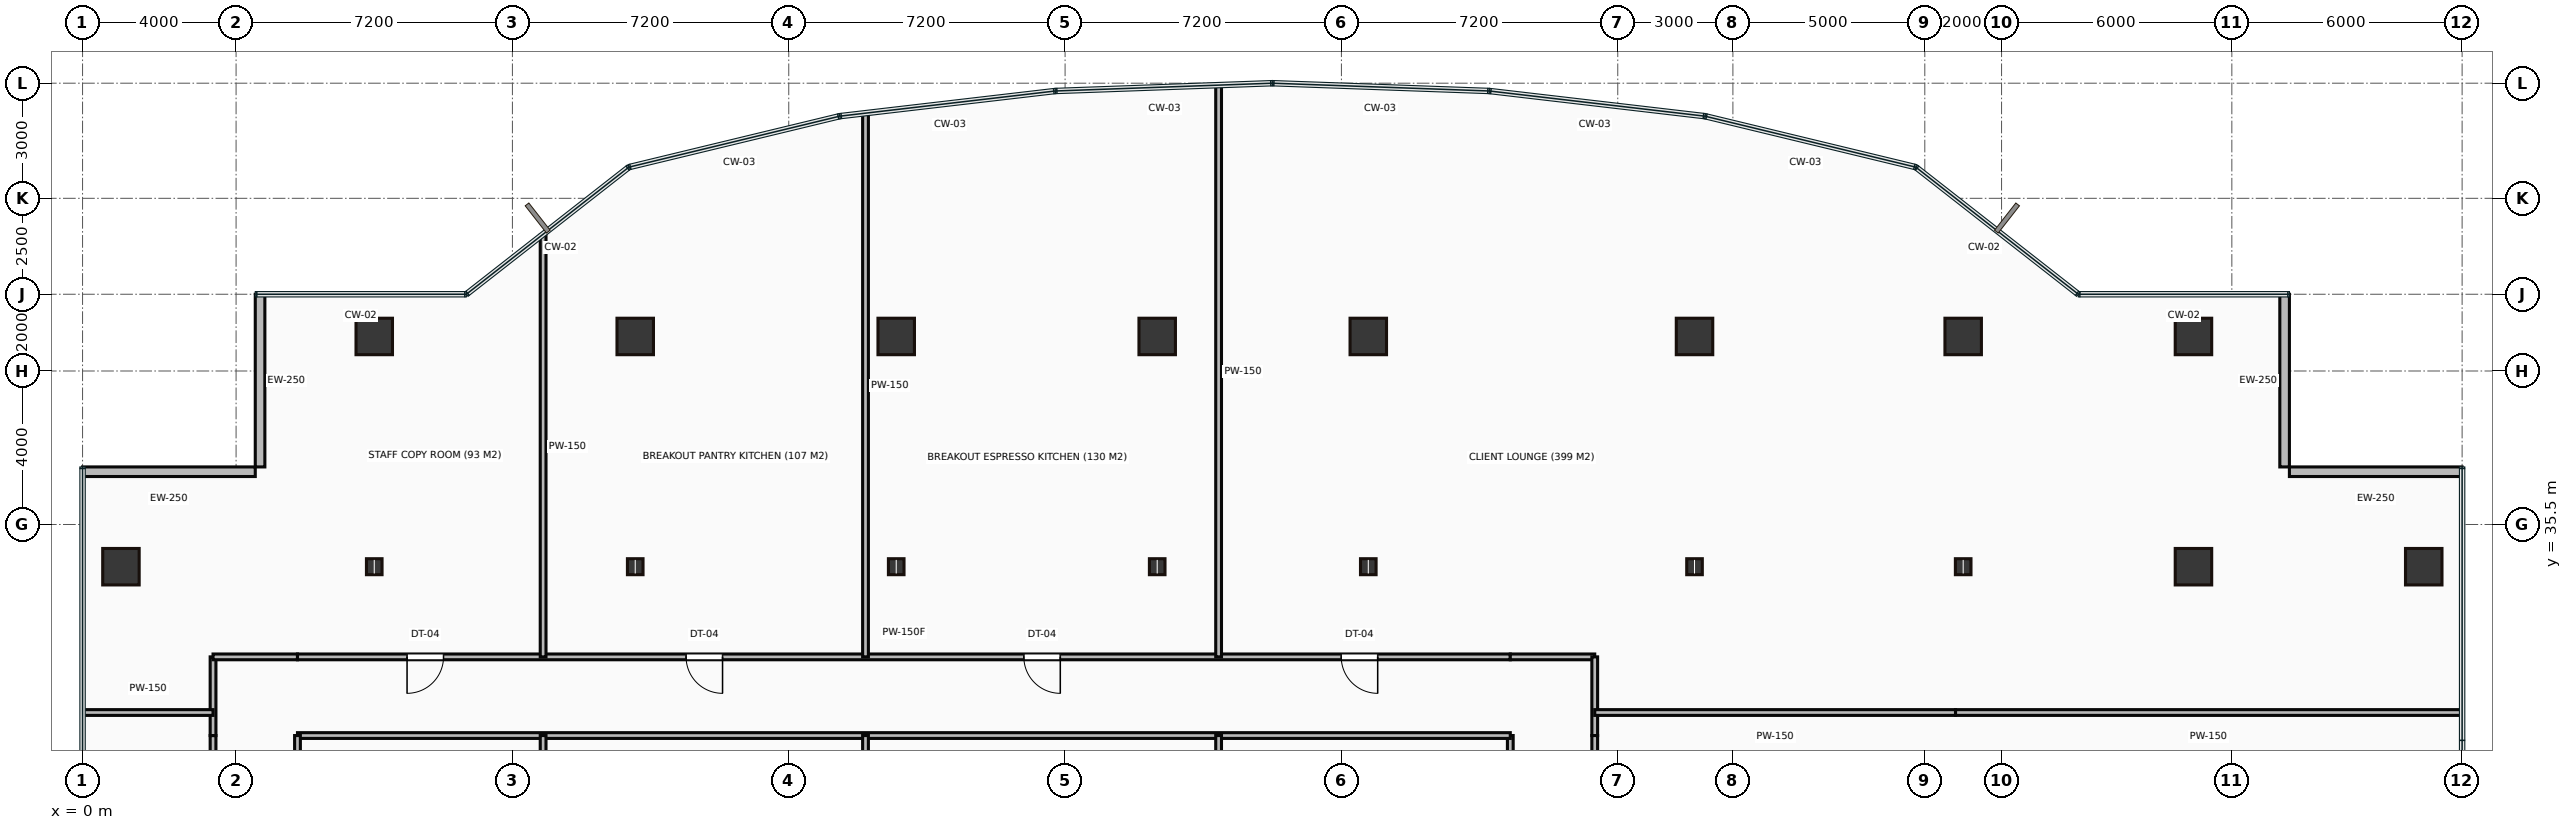
"""IFC4 building model, lengths in metres.
Left out: names, types, materials, properties, quantities, classifications, styles, units other than length and angle.
Written with IfcOpenShell. Run it as: python <this file> out.ifc"""

import sys

from ifc_helpers import new_model, si_unit, direction, frame, frame_2d, origin, origin_2d, place, context, subcontext, project, spatial, rectangle, hollow_rectangle, i_section, extrude, source, transform, mapped, element, fill, save


model = new_model("IFC4")
c1 = context("Model", 3, precision=1e-05, world=origin(), true_north=direction((0.0, 1.0)))
c2 = subcontext(c1, "Body", "Model", "MODEL_VIEW")
j1 = project(units=[si_unit("LENGTHUNIT", "METRE"), si_unit("PLANEANGLEUNIT", "RADIAN")], contexts=[c1])
p1 = place(None, origin())
s1 = spatial("IfcSite", under=j1, at=p1, CompositionType="ELEMENT")
p2 = place(p1, origin())
s2 = spatial("IfcBuilding", under=s1, at=p2, CompositionType="ELEMENT")
p3 = place(p2, frame((0.0, 0.0, 47.1)))
s3 = spatial("IfcBuildingStorey", under=s2, at=p3, CompositionType="ELEMENT", Elevation=47.1)
m1 = source(origin(), c2, "Body", "SweptSolid", [
    extrude(hollow_rectangle(XDim=0.95, YDim=0.95, WallThickness=0.045, at=origin_2d()), origin(), (0.0, 0.0, 1.0), 3.65),
])
p4 = place(p3, frame((1.0, 34.4, 0.0), z_axis=(0.0, 0.0, 1.0), x_axis=(1.0, 0.0, 0.0)))
e1 = element("IfcColumn", 1, at=p4, inside=s3, PredefinedType="COLUMN", context=c2, shape_type="MappedRepresentation", body=[
    mapped(m1, transform((0.0, 0.0, 0.0))),
])
m2 = source(origin(), c2, "Body", "SweptSolid", [
    extrude(i_section(OverallWidth=0.406, OverallDepth=0.416, WebThickness=0.03, FlangeThickness=0.048, at=origin_2d()), origin(), (0.0, 0.0, 1.0), 3.65),
])
p5 = place(p3, frame((7.6, 34.4, 0.0), z_axis=(0.0, 0.0, 1.0), x_axis=(1.0, 0.0, 0.0)))
e2 = element("IfcColumn", 2, at=p5, inside=s3, PredefinedType="COLUMN", context=c2, shape_type="MappedRepresentation", body=[
    mapped(m2, transform((0.0, 0.0, 0.0))),
])
p6 = place(p3, frame((7.6, 40.4, 0.0), z_axis=(0.0, 0.0, 1.0), x_axis=(1.0, 0.0, 0.0)))
e3 = element("IfcColumn", 3, at=p6, inside=s3, PredefinedType="COLUMN", context=c2, shape_type="MappedRepresentation", body=[
    mapped(m1, transform((0.0, 0.0, 0.0))),
])
p7 = place(p3, frame((14.4, 34.4, 0.0), z_axis=(0.0, 0.0, 1.0), x_axis=(1.0, 0.0, 0.0)))
e4 = element("IfcColumn", 4, at=p7, inside=s3, PredefinedType="COLUMN", context=c2, shape_type="MappedRepresentation", body=[
    mapped(m2, transform((0.0, 0.0, 0.0))),
])
p8 = place(p3, frame((14.4, 40.4, 0.0), z_axis=(0.0, 0.0, 1.0), x_axis=(1.0, 0.0, 0.0)))
e5 = element("IfcColumn", 5, at=p8, inside=s3, PredefinedType="COLUMN", context=c2, shape_type="MappedRepresentation", body=[
    mapped(m1, transform((0.0, 0.0, 0.0))),
])
p9 = place(p3, frame((21.2, 34.4, 0.0), z_axis=(0.0, 0.0, 1.0), x_axis=(1.0, 0.0, 0.0)))
e6 = element("IfcColumn", 6, at=p9, inside=s3, PredefinedType="COLUMN", context=c2, shape_type="MappedRepresentation", body=[
    mapped(m2, transform((0.0, 0.0, 0.0))),
])
p10 = place(p3, frame((21.2, 40.4, 0.0), z_axis=(0.0, 0.0, 1.0), x_axis=(1.0, 0.0, 0.0)))
e7 = element("IfcColumn", 7, at=p10, inside=s3, PredefinedType="COLUMN", context=c2, shape_type="MappedRepresentation", body=[
    mapped(m1, transform((0.0, 0.0, 0.0))),
])
p11 = place(p3, frame((28.0, 34.4, 0.0), z_axis=(0.0, 0.0, 1.0), x_axis=(1.0, 0.0, 0.0)))
e8 = element("IfcColumn", 8, at=p11, inside=s3, PredefinedType="COLUMN", context=c2, shape_type="MappedRepresentation", body=[
    mapped(m2, transform((0.0, 0.0, 0.0))),
])
p12 = place(p3, frame((28.0, 40.4, 0.0), z_axis=(0.0, 0.0, 1.0), x_axis=(1.0, 0.0, 0.0)))
e9 = element("IfcColumn", 9, at=p12, inside=s3, PredefinedType="COLUMN", context=c2, shape_type="MappedRepresentation", body=[
    mapped(m1, transform((0.0, 0.0, 0.0))),
])
p13 = place(p3, frame((33.5, 34.4, 0.0), z_axis=(0.0, 0.0, 1.0), x_axis=(1.0, 0.0, 0.0)))
e10 = element("IfcColumn", 10, at=p13, inside=s3, PredefinedType="COLUMN", context=c2, shape_type="MappedRepresentation", body=[
    mapped(m2, transform((0.0, 0.0, 0.0))),
])
p14 = place(p3, frame((33.5, 40.4, 0.0), z_axis=(0.0, 0.0, 1.0), x_axis=(1.0, 0.0, 0.0)))
e11 = element("IfcColumn", 11, at=p14, inside=s3, PredefinedType="COLUMN", context=c2, shape_type="MappedRepresentation", body=[
    mapped(m1, transform((0.0, 0.0, 0.0))),
])
p15 = place(p3, frame((42.0, 34.4, 0.0), z_axis=(0.0, 0.0, 1.0), x_axis=(1.0, 0.0, 0.0)))
e12 = element("IfcColumn", 12, at=p15, inside=s3, PredefinedType="COLUMN", context=c2, shape_type="MappedRepresentation", body=[
    mapped(m2, transform((0.0, 0.0, 0.0))),
])
p16 = place(p3, frame((42.0, 40.4, 0.0), z_axis=(0.0, 0.0, 1.0), x_axis=(1.0, 0.0, 0.0)))
e13 = element("IfcColumn", 13, at=p16, inside=s3, PredefinedType="COLUMN", context=c2, shape_type="MappedRepresentation", body=[
    mapped(m1, transform((0.0, 0.0, 0.0))),
])
p17 = place(p3, frame((49.0, 34.4, 0.0), z_axis=(0.0, 0.0, 1.0), x_axis=(1.0, 0.0, 0.0)))
e14 = element("IfcColumn", 14, at=p17, inside=s3, PredefinedType="COLUMN", context=c2, shape_type="MappedRepresentation", body=[
    mapped(m2, transform((0.0, 0.0, 0.0))),
])
for number, where, z_axis, x_axis in (
    (15, (49.0, 40.4, 0.0), (0.0, 0.0, 1.0), (1.0, 0.0, 0.0)),
    (16, (55.0, 34.4, 0.0), (0.0, 0.0, 1.0), (1.0, 0.0, 0.0)),
    (17, (55.0, 40.4, 0.0), (0.0, 0.0, 1.0), (1.0, 0.0, 0.0)),
    (18, (61.0, 34.4, 0.0), (0.0, 0.0, 1.0), (1.0, 0.0, 0.0)),
):
    element("IfcColumn", number, at=place(p3, frame(where, z_axis=z_axis, x_axis=x_axis)), inside=s3, PredefinedType="COLUMN", context=c2, shape_type="MappedRepresentation", body=[
        mapped(m1, transform((0.0, 0.0, 0.0))),
    ])
m3 = source(origin(), c2, "Body", "SweptSolid", [
    extrude(rectangle(XDim=4.5, YDim=0.25, at=frame_2d((2.25, 0.0))), origin(), (0.0, 0.0, 1.0), 3.4),
])
for number, where, z_axis, x_axis in (
    (19, (62.0, 36.875, 0.0), (0.0, 0.0, 1.0), (-1.0, 0.0, 0.0)),
    (20, (57.375, 37.0, 0.0), (0.0, 0.0, 1.0), (0.0, 1.0, 0.0)),
    (21, (4.625, 41.5, 0.0), (0.0, 0.0, 1.0), (0.0, -1.0, 0.0)),
    (22, (4.5, 36.875, 0.0), (0.0, 0.0, 1.0), (-1.0, 0.0, 0.0)),
):
    element("IfcWall", number, at=place(p3, frame(where, z_axis=z_axis, x_axis=x_axis)), inside=s3, PredefinedType="STANDARD", context=c2, shape_type="MappedRepresentation", body=[
        mapped(m3, transform((0.0, 0.0, 0.0))),
    ])
m4 = source(origin(), c2, "Body", "SweptSolid", [
    extrude(rectangle(XDim=13.75, YDim=0.15, at=frame_2d((6.875, 0.0))), origin(), (0.0, 0.0, 1.0), 3.4),
])
p18 = place(p3, frame((3.4, 16.25, 0.0), z_axis=(0.0, 0.0, 1.0), x_axis=(0.0, 1.0, 0.0)))
e23 = element("IfcWall", 23, at=p18, inside=s3, PredefinedType="PARTITIONING", context=c2, shape_type="MappedRepresentation", body=[
    mapped(m4, transform((0.0, 0.0, 0.0))),
])
p19 = place(p18, frame((6.4, 0.0, 0.0)))
e24 = element("IfcOpeningElement", 24, at=p19, cuts=e23, PredefinedType="OPENING", context=c2, shape_type="SweptSolid", body=[
    extrude(rectangle(XDim=0.95, YDim=2.15, at=frame_2d((0.475, 1.075))), frame((0.0, 0.085, 0.0), z_axis=(0.0, -1.0, 0.0), x_axis=(1.0, 0.0, 0.0)), (0.0, 0.0, 1.0), 0.17),
])
m5 = source(origin(), c2, "Body", "SweptSolid", [
    extrude(rectangle(XDim=2.05, YDim=0.15, at=frame_2d((1.025, 0.0))), origin(), (0.0, 0.0, 1.0), 3.4),
])
p20 = place(p3, frame((3.4, 30.0, 0.0), z_axis=(0.0, 0.0, 1.0), x_axis=(0.0, 1.0, 0.0)))
e25 = element("IfcWall", 25, at=p20, inside=s3, PredefinedType="PARTITIONING", context=c2, shape_type="MappedRepresentation", body=[
    mapped(m5, transform((0.0, 0.0, 0.0))),
])
m6 = source(origin(), c2, "Body", "SweptSolid", [
    extrude(rectangle(XDim=2.2, YDim=0.15, at=frame_2d((1.1, 0.0))), origin(), (0.0, 0.0, 1.0), 3.4),
])
p21 = place(p3, frame((3.4, 32.05, 0.0), z_axis=(0.0, 0.0, 1.0), x_axis=(1.0, 0.0, 0.0)))
e26 = element("IfcWall", 26, at=p21, inside=s3, PredefinedType="PARTITIONING", context=c2, shape_type="MappedRepresentation", body=[
    mapped(m6, transform((0.0, 0.0, 0.0))),
])
m7 = source(origin(), c2, "Body", "SweptSolid", [
    extrude(rectangle(XDim=31.6, YDim=0.15, at=frame_2d((15.8, 0.0))), origin(), (0.0, 0.0, 1.0), 3.4),
])
p22 = place(p3, frame((5.6, 32.05, 0.0), z_axis=(0.0, 0.0, 1.0), x_axis=(1.0, 0.0, 0.0)))
e27 = element("IfcWall", 27, at=p22, inside=s3, PredefinedType="PARTITIONING", context=c2, shape_type="MappedRepresentation", body=[
    mapped(m7, transform((0.0, 0.0, 0.0))),
])
p23 = place(p22, frame((2.855, 0.0, 0.0)))
e28 = element("IfcOpeningElement", 28, at=p23, cuts=e27, PredefinedType="OPENING", context=c2, shape_type="SweptSolid", body=[
    extrude(rectangle(XDim=0.95, YDim=2.15, at=frame_2d((0.475, 1.075))), frame((0.0, 0.085, 0.0), z_axis=(0.0, -1.0, 0.0), x_axis=(1.0, 0.0, 0.0)), (0.0, 0.0, 1.0), 0.17),
])
p24 = place(p22, frame((10.125, 0.0, 0.0)))
e29 = element("IfcOpeningElement", 29, at=p24, cuts=e27, PredefinedType="OPENING", context=c2, shape_type="SweptSolid", body=[
    extrude(rectangle(XDim=0.95, YDim=2.15, at=frame_2d((0.475, 1.075))), frame((0.0, 0.085, 0.0), z_axis=(0.0, -1.0, 0.0), x_axis=(1.0, 0.0, 0.0)), (0.0, 0.0, 1.0), 0.17),
])
p25 = place(p22, frame((18.925, 0.0, 0.0)))
e30 = element("IfcOpeningElement", 30, at=p25, cuts=e27, PredefinedType="OPENING", context=c2, shape_type="SweptSolid", body=[
    extrude(rectangle(XDim=0.95, YDim=2.15, at=frame_2d((0.475, 1.075))), frame((0.0, 0.085, 0.0), z_axis=(0.0, -1.0, 0.0), x_axis=(1.0, 0.0, 0.0)), (0.0, 0.0, 1.0), 0.17),
])
p26 = place(p22, frame((27.195, 0.0, 0.0)))
e31 = element("IfcOpeningElement", 31, at=p26, cuts=e27, PredefinedType="OPENING", context=c2, shape_type="SweptSolid", body=[
    extrude(rectangle(XDim=0.95, YDim=2.15, at=frame_2d((0.475, 1.075))), frame((0.0, 0.085, 0.0), z_axis=(0.0, -1.0, 0.0), x_axis=(1.0, 0.0, 0.0)), (0.0, 0.0, 1.0), 0.17),
])
m8 = source(origin(), c2, "Body", "SweptSolid", [
    extrude(rectangle(XDim=2.2, YDim=0.15, at=frame_2d((1.1, 0.0))), origin(), (0.0, 0.0, 1.0), 3.4),
])
p27 = place(p3, frame((37.2, 32.05, 0.0), z_axis=(0.0, 0.0, 1.0), x_axis=(1.0, 0.0, 0.0)))
e32 = element("IfcWall", 32, at=p27, inside=s3, PredefinedType="PARTITIONING", context=c2, shape_type="MappedRepresentation", body=[
    mapped(m8, transform((0.0, 0.0, 0.0))),
])
p28 = place(p3, frame((39.4, 32.05, 0.0), z_axis=(0.0, 0.0, 1.0), x_axis=(0.0, -1.0, 0.0)))
e33 = element("IfcWall", 33, at=p28, inside=s3, PredefinedType="PARTITIONING", context=c2, shape_type="MappedRepresentation", body=[
    mapped(m5, transform((0.0, 0.0, 0.0))),
])
p29 = place(p3, frame((39.4, 30.0, 0.0), z_axis=(0.0, 0.0, 1.0), x_axis=(0.0, -1.0, 0.0)))
e34 = element("IfcWall", 34, at=p29, inside=s3, PredefinedType="PARTITIONING", context=c2, shape_type="MappedRepresentation", body=[
    mapped(m4, transform((0.0, 0.0, 0.0))),
])
p30 = place(p29, frame((6.4, 0.0, 0.0)))
e35 = element("IfcOpeningElement", 35, at=p30, cuts=e34, PredefinedType="OPENING", context=c2, shape_type="SweptSolid", body=[
    extrude(rectangle(XDim=0.95, YDim=2.15, at=frame_2d((0.475, 1.075))), frame((0.0, 0.085, 0.0), z_axis=(0.0, -1.0, 0.0), x_axis=(1.0, 0.0, 0.0)), (0.0, 0.0, 1.0), 0.17),
])
p31 = place(p3, frame((37.2, 16.25, 0.0), z_axis=(0.0, 0.0, 1.0), x_axis=(0.0, 1.0, 0.0)))
e36 = element("IfcWall", 36, at=p31, inside=s3, PredefinedType="PARTITIONING", context=c2, shape_type="MappedRepresentation", body=[
    mapped(m4, transform((0.0, 0.0, 0.0))),
])
p32 = place(p31, frame((6.4, 0.0, 0.0)))
e37 = element("IfcOpeningElement", 37, at=p32, cuts=e36, PredefinedType="OPENING", context=c2, shape_type="SweptSolid", body=[
    extrude(rectangle(XDim=0.95, YDim=2.15, at=frame_2d((0.475, 1.075))), frame((0.0, 0.085, 0.0), z_axis=(0.0, -1.0, 0.0), x_axis=(1.0, 0.0, 0.0)), (0.0, 0.0, 1.0), 0.17),
])
m9 = source(origin(), c2, "Body", "SweptSolid", [
    extrude(rectangle(XDim=31.6, YDim=0.15, at=frame_2d((15.8, 0.0))), origin(), (0.0, 0.0, 1.0), 2.978),
])
p33 = place(p3, frame((37.2, 30.0, 0.0), z_axis=(0.0, 0.0, 1.0), x_axis=(-1.0, 0.0, 0.0)))
e38 = element("IfcWall", 38, at=p33, inside=s3, PredefinedType="PARTITIONING", context=c2, shape_type="MappedRepresentation", body=[
    mapped(m9, transform((0.0, 0.0, 0.0))),
])
p34 = place(p3, frame((5.6, 30.0, 0.0), z_axis=(0.0, 0.0, 1.0), x_axis=(0.0, -1.0, 0.0)))
e39 = element("IfcWall", 39, at=p34, inside=s3, PredefinedType="PARTITIONING", context=c2, shape_type="MappedRepresentation", body=[
    mapped(m4, transform((0.0, 0.0, 0.0))),
])
p35 = place(p34, frame((6.4, 0.0, 0.0)))
e40 = element("IfcOpeningElement", 40, at=p35, cuts=e39, PredefinedType="OPENING", context=c2, shape_type="SweptSolid", body=[
    extrude(rectangle(XDim=0.95, YDim=2.15, at=frame_2d((0.475, 1.075))), frame((0.0, 0.085, 0.0), z_axis=(0.0, -1.0, 0.0), x_axis=(1.0, 0.0, 0.0)), (0.0, 0.0, 1.0), 0.17),
])
m10 = source(origin(), c2, "Body", "SweptSolid", [
    extrude(rectangle(XDim=3.38, YDim=0.15, at=frame_2d((1.69, 0.0))), origin(), (0.0, 0.0, 1.0), 3.4),
])
p36 = place(p3, frame((0.02, 30.6, 0.0), z_axis=(0.0, 0.0, 1.0), x_axis=(1.0, 0.0, 0.0)))
e41 = element("IfcWall", 41, at=p36, inside=s3, PredefinedType="PARTITIONING", context=c2, shape_type="MappedRepresentation", body=[
    mapped(m10, transform((0.0, 0.0, 0.0))),
])
p37 = place(p3, frame((12.0, 30.0, 0.0), z_axis=(0.0, 0.0, 1.0), x_axis=(0.0, -1.0, 0.0)))
e42 = element("IfcWall", 42, at=p37, inside=s3, PredefinedType="PARTITIONING", context=c2, shape_type="MappedRepresentation", body=[
    mapped(m4, transform((0.0, 0.0, 0.0))),
])
m11 = source(origin(), c2, "Body", "SweptSolid", [
    extrude(rectangle(XDim=10.989, YDim=0.15, at=frame_2d((5.495, 0.0))), origin(), (0.0, 0.0, 1.0), 3.4),
])
p38 = place(p3, frame((12.0, 43.039, 0.0), z_axis=(0.0, 0.0, 1.0), x_axis=(0.0, -1.0, 0.0)))
e43 = element("IfcWall", 43, at=p38, inside=s3, PredefinedType="PARTITIONING", context=c2, shape_type="MappedRepresentation", body=[
    mapped(m11, transform((0.0, 0.0, 0.0))),
])
p39 = place(p3, frame((20.4, 30.0, 0.0), z_axis=(0.0, 0.0, 1.0), x_axis=(0.0, -1.0, 0.0)))
e44 = element("IfcWall", 44, at=p39, inside=s3, PredefinedType="PARTITIONING", context=c2, shape_type="MappedRepresentation", body=[
    mapped(m4, transform((0.0, 0.0, 0.0))),
])
m12 = source(origin(), c2, "Body", "SweptSolid", [
    extrude(rectangle(XDim=14.149, YDim=0.15, at=frame_2d((7.074, 0.0))), origin(), (0.0, 0.0, 1.0), 3.4),
])
p40 = place(p3, frame((20.4, 46.199, 0.0), z_axis=(0.0, 0.0, 1.0), x_axis=(0.0, -1.0, 0.0)))
e45 = element("IfcWall", 45, at=p40, inside=s3, PredefinedType="PARTITIONING", context=c2, shape_type="MappedRepresentation", body=[
    mapped(m12, transform((0.0, 0.0, 0.0))),
])
p41 = place(p3, frame((29.6, 30.0, 0.0), z_axis=(0.0, 0.0, 1.0), x_axis=(0.0, -1.0, 0.0)))
e46 = element("IfcWall", 46, at=p41, inside=s3, PredefinedType="PARTITIONING", context=c2, shape_type="MappedRepresentation", body=[
    mapped(m4, transform((0.0, 0.0, 0.0))),
])
m13 = source(origin(), c2, "Body", "SweptSolid", [
    extrude(rectangle(XDim=14.88, YDim=0.15, at=frame_2d((7.44, 0.0))), origin(), (0.0, 0.0, 1.0), 3.4),
])
p42 = place(p3, frame((29.6, 46.93, 0.0), z_axis=(0.0, 0.0, 1.0), x_axis=(0.0, -1.0, 0.0)))
e47 = element("IfcWall", 47, at=p42, inside=s3, PredefinedType="PARTITIONING", context=c2, shape_type="MappedRepresentation", body=[
    mapped(m13, transform((0.0, 0.0, 0.0))),
])
m14 = source(origin(), c2, "Body", "SweptSolid", [
    extrude(rectangle(XDim=13.18, YDim=0.15, at=frame_2d((6.59, 0.0))), origin(), (0.0, 0.0, 1.0), 3.4),
])
p43 = place(p3, frame((61.98, 30.6, 0.0), z_axis=(0.0, 0.0, 1.0), x_axis=(-1.0, 0.0, 0.0)))
e48 = element("IfcWall", 48, at=p43, inside=s3, PredefinedType="PARTITIONING", context=c2, shape_type="MappedRepresentation", body=[
    mapped(m14, transform((0.0, 0.0, 0.0))),
])
m15 = source(origin(), c2, "Body", "SweptSolid", [
    extrude(rectangle(XDim=9.4, YDim=0.15, at=frame_2d((4.7, 0.0))), origin(), (0.0, 0.0, 1.0), 3.4),
])
p44 = place(p3, frame((48.8, 30.6, 0.0), z_axis=(0.0, 0.0, 1.0), x_axis=(-1.0, 0.0, 0.0)))
e49 = element("IfcWall", 49, at=p44, inside=s3, PredefinedType="PARTITIONING", context=c2, shape_type="MappedRepresentation", body=[
    mapped(m15, transform((0.0, 0.0, 0.0))),
])
m16 = source(origin(), c2, "Body", "SweptSolid", [
    extrude(rectangle(XDim=0.95, YDim=2.15, at=frame_2d((0.475, 1.075))), frame((0.0, 0.025, 0.0), z_axis=(0.0, -1.0, 0.0), x_axis=(1.0, 0.0, 0.0)), (0.0, 0.0, 1.0), 0.05),
])
p45 = place(p23, origin())
e50 = element("IfcDoor", 50, at=p45, inside=s3, OperationType="SINGLE_SWING_LEFT", PredefinedType="DOOR", context=c2, shape_type="MappedRepresentation", body=[
    mapped(m16, transform((0.0, 0.0, 0.0))),
])
fill(e28, e50)
p46 = place(p24, origin())
e51 = element("IfcDoor", 51, at=p46, inside=s3, OperationType="SINGLE_SWING_RIGHT", PredefinedType="DOOR", context=c2, shape_type="MappedRepresentation", body=[
    mapped(m16, transform((0.0, 0.0, 0.0))),
])
fill(e29, e51)
p47 = place(p25, origin())
e52 = element("IfcDoor", 52, at=p47, inside=s3, OperationType="SINGLE_SWING_RIGHT", PredefinedType="DOOR", context=c2, shape_type="MappedRepresentation", body=[
    mapped(m16, transform((0.0, 0.0, 0.0))),
])
fill(e30, e52)
p48 = place(p26, origin())
e53 = element("IfcDoor", 53, at=p48, inside=s3, OperationType="SINGLE_SWING_RIGHT", PredefinedType="DOOR", context=c2, shape_type="MappedRepresentation", body=[
    mapped(m16, transform((0.0, 0.0, 0.0))),
])
fill(e31, e53)
save(model, sys.argv[1])
